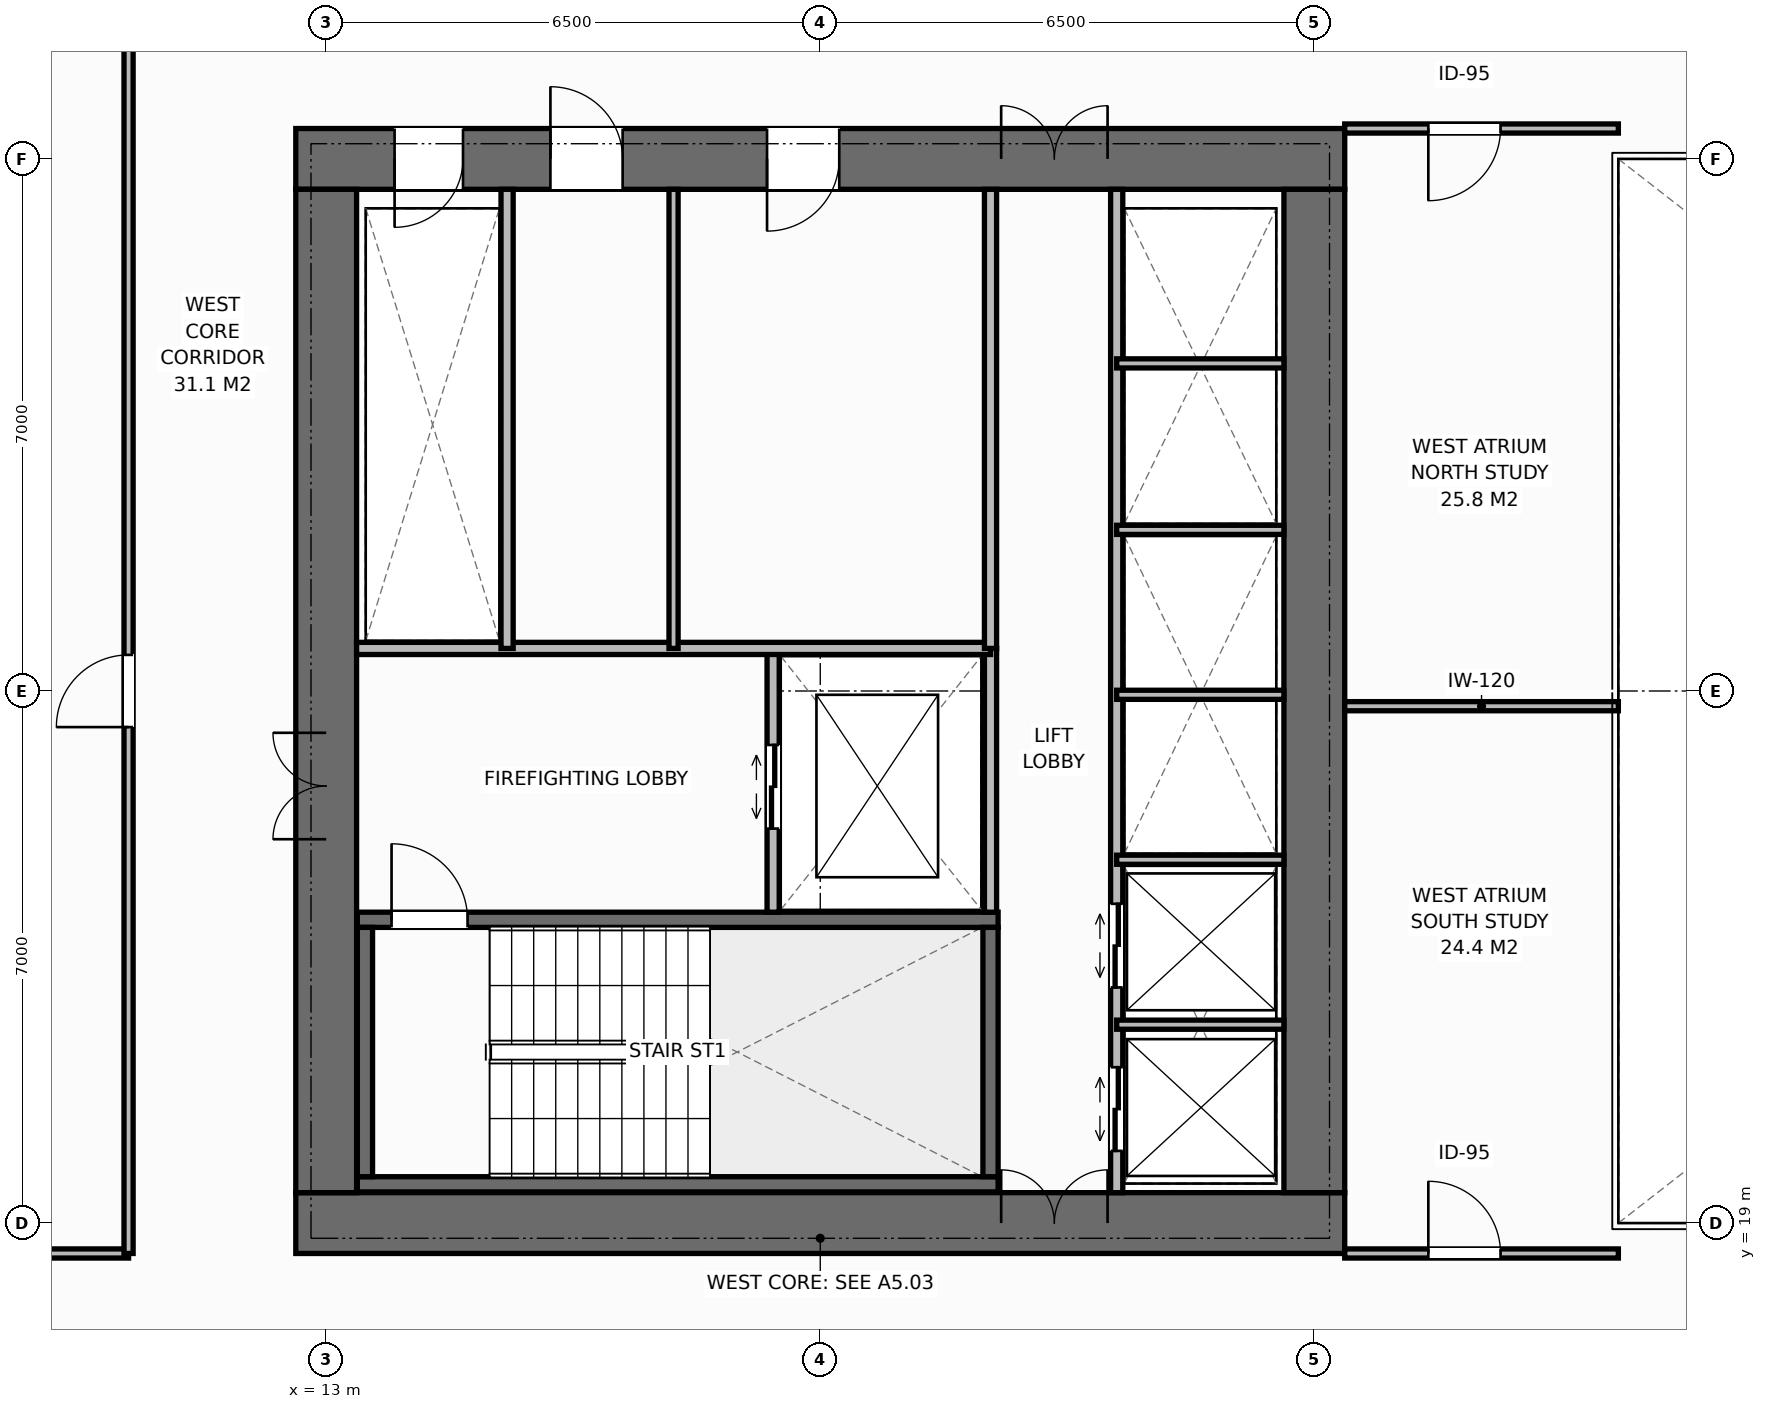
"""IFC4 building model, lengths in metres.
Left out: names, types, materials, properties, quantities, classifications, styles, units other than length and angle.
Written with IfcOpenShell. Run it as: python <this file> out.ifc"""

import sys

from ifc_helpers import new_model, si_unit, direction, frame, frame_2d, origin, place, context, subcontext, project, spatial, rectangle, extrude, element, fill, save


model = new_model("IFC4")
c1 = context("Model", 3, precision=1e-05, world=origin(), true_north=direction((0.0, 1.0)))
c2 = subcontext(c1, "Body", "Model", "MODEL_VIEW")
j1 = project(units=[si_unit("LENGTHUNIT", "METRE"), si_unit("PLANEANGLEUNIT", "RADIAN")], contexts=[c1])
p1 = place(None, origin())
s1 = spatial("IfcSite", under=j1, at=p1, CompositionType="ELEMENT")
p2 = place(p1, origin())
s2 = spatial("IfcBuilding", under=s1, at=p2, CompositionType="ELEMENT")
p3 = place(p2, frame((0.0, 0.0, 62.0)))
s3 = spatial("IfcBuildingStorey", under=s2, at=p3, CompositionType="ELEMENT", Elevation=62.0)
p4 = place(p3, frame((12.6, 19.0, 0.0), z_axis=(0.0, 0.0, 1.0), x_axis=(1.0, 0.0, 0.0)))
e1 = element("IfcWall", 1, at=p4, inside=s3, PredefinedType="SHEAR", context=c2, shape_type="SweptSolid", body=[
    extrude(rectangle(XDim=13.8, YDim=0.8, at=frame_2d((6.9, 0.0))), origin(), (0.0, 0.0, 1.0), 3.8),
])
p5 = place(p4, frame((9.28, 0.0, 0.0)))
e2 = element("IfcOpeningElement", 2, at=p5, cuts=e1, PredefinedType="OPENING", context=c2, shape_type="SweptSolid", body=[
    extrude(rectangle(XDim=1.4, YDim=2.2, at=frame_2d((0.7, 1.1))), frame((0.0, 0.41, 0.0), z_axis=(0.0, -1.0, 0.0), x_axis=(1.0, 0.0, 0.0)), (0.0, 0.0, 1.0), 0.82),
])
p6 = place(p3, frame((12.6, 33.0, 0.0), z_axis=(0.0, 0.0, 1.0), x_axis=(1.0, 0.0, 0.0)))
e3 = element("IfcWall", 3, at=p6, inside=s3, PredefinedType="SHEAR", context=c2, shape_type="SweptSolid", body=[
    extrude(rectangle(XDim=13.8, YDim=0.8, at=frame_2d((6.9, 0.0))), origin(), (0.0, 0.0, 1.0), 3.8),
])
p7 = place(p6, frame((1.3, 0.0, 0.0)))
e4 = element("IfcOpeningElement", 4, at=p7, cuts=e3, PredefinedType="OPENING", context=c2, shape_type="SweptSolid", body=[
    extrude(rectangle(XDim=0.9, YDim=2.15, at=frame_2d((0.45, 1.075))), frame((0.0, 0.41, 0.0), z_axis=(0.0, -1.0, 0.0), x_axis=(1.0, 0.0, 0.0)), (0.0, 0.0, 1.0), 0.82),
])
p8 = place(p6, frame((3.35, 0.0, 0.0)))
e5 = element("IfcOpeningElement", 5, at=p8, cuts=e3, PredefinedType="OPENING", context=c2, shape_type="SweptSolid", body=[
    extrude(rectangle(XDim=0.95, YDim=2.15, at=frame_2d((0.475, 1.075))), frame((0.0, 0.41, 0.0), z_axis=(0.0, -1.0, 0.0), x_axis=(1.0, 0.0, 0.0)), (0.0, 0.0, 1.0), 0.82),
])
p9 = place(p6, frame((6.2, 0.0, 0.0)))
e6 = element("IfcOpeningElement", 6, at=p9, cuts=e3, PredefinedType="OPENING", context=c2, shape_type="SweptSolid", body=[
    extrude(rectangle(XDim=0.95, YDim=2.15, at=frame_2d((0.475, 1.075))), frame((0.0, 0.41, 0.0), z_axis=(0.0, -1.0, 0.0), x_axis=(1.0, 0.0, 0.0)), (0.0, 0.0, 1.0), 0.82),
])
p10 = place(p6, frame((9.28, 0.0, 0.0)))
e7 = element("IfcOpeningElement", 7, at=p10, cuts=e3, PredefinedType="OPENING", context=c2, shape_type="SweptSolid", body=[
    extrude(rectangle(XDim=1.4, YDim=2.2, at=frame_2d((0.7, 1.1))), frame((0.0, 0.41, 0.0), z_axis=(0.0, -1.0, 0.0), x_axis=(1.0, 0.0, 0.0)), (0.0, 0.0, 1.0), 0.82),
])
p11 = place(p3, frame((13.0, 19.4, 0.0), z_axis=(0.0, 0.0, 1.0), x_axis=(0.0, 1.0, 0.0)))
e8 = element("IfcWall", 8, at=p11, inside=s3, PredefinedType="SHEAR", context=c2, shape_type="SweptSolid", body=[
    extrude(rectangle(XDim=13.2, YDim=0.8, at=frame_2d((6.6, 0.0))), origin(), (0.0, 0.0, 1.0), 3.8),
])
p12 = place(p11, frame((4.65, 0.0, 0.0)))
e9 = element("IfcOpeningElement", 9, at=p12, cuts=e8, PredefinedType="OPENING", context=c2, shape_type="SweptSolid", body=[
    extrude(rectangle(XDim=1.4, YDim=2.2, at=frame_2d((0.7, 1.1))), frame((0.0, 0.41, 0.0), z_axis=(0.0, -1.0, 0.0), x_axis=(1.0, 0.0, 0.0)), (0.0, 0.0, 1.0), 0.82),
])
p13 = place(p3, frame((26.0, 19.4, 0.0), z_axis=(0.0, 0.0, 1.0), x_axis=(0.0, 1.0, 0.0)))
e10 = element("IfcWall", 10, at=p13, inside=s3, PredefinedType="SHEAR", context=c2, shape_type="SweptSolid", body=[
    extrude(rectangle(XDim=13.2, YDim=0.8, at=frame_2d((6.6, 0.0))), origin(), (0.0, 0.0, 1.0), 3.8),
])
p14 = place(p3, frame((13.41, 19.51, 0.0), z_axis=(0.0, 0.0, 1.0), x_axis=(1.0, 0.0, 0.0)))
e11 = element("IfcWall", 11, at=p14, inside=s3, PredefinedType="SHEAR", context=c2, shape_type="SweptSolid", body=[
    extrude(rectangle(XDim=8.43, YDim=0.2, at=frame_2d((4.215, 0.0))), origin(), (0.0, 0.0, 1.0), 3.8),
])
p15 = place(p3, frame((13.41, 22.99, 0.0), z_axis=(0.0, 0.0, 1.0), x_axis=(1.0, 0.0, 0.0)))
e12 = element("IfcWall", 12, at=p15, inside=s3, PredefinedType="SHEAR", context=c2, shape_type="SweptSolid", body=[
    extrude(rectangle(XDim=8.43, YDim=0.2, at=frame_2d((4.215, 0.0))), origin(), (0.0, 0.0, 1.0), 3.8),
])
p16 = place(p15, frame((0.45, 0.0, 0.0)))
e13 = element("IfcOpeningElement", 13, at=p16, cuts=e12, PredefinedType="OPENING", context=c2, shape_type="SweptSolid", body=[
    extrude(rectangle(XDim=1.0, YDim=2.15, at=frame_2d((0.5, 1.075))), frame((0.0, 0.11, 0.0), z_axis=(0.0, -1.0, 0.0), x_axis=(1.0, 0.0, 0.0)), (0.0, 0.0, 1.0), 0.22),
])
for number, where, z_axis, x_axis in (
    (14, (13.51, 19.61, 0.0), (0.0, 0.0, 1.0), (0.0, 1.0, 0.0)),
    (15, (21.74, 19.61, 0.0), (0.0, 0.0, 1.0), (0.0, 1.0, 0.0)),
):
    element("IfcWall", number, at=place(p3, frame(where, z_axis=z_axis, x_axis=x_axis)), inside=s3, PredefinedType="SHEAR", context=c2, shape_type="SweptSolid", body=[
        extrude(rectangle(XDim=3.28, YDim=0.2, at=frame_2d((1.64, 0.0))), origin(), (0.0, 0.0, 1.0), 3.8),
    ])
p17 = place(p3, frame((21.74, 23.09, 0.0), z_axis=(0.0, 0.0, 1.0), x_axis=(0.0, 1.0, 0.0)))
e16 = element("IfcWall", 16, at=p17, inside=s3, PredefinedType="STANDARD", context=c2, shape_type="SweptSolid", body=[
    extrude(rectangle(XDim=3.47, YDim=0.16, at=frame_2d((1.735, 0.0))), origin(), (0.0, 0.0, 1.0), 3.55),
])
p18 = place(p3, frame((18.88, 23.09, 0.0), z_axis=(0.0, 0.0, 1.0), x_axis=(0.0, 1.0, 0.0)))
e17 = element("IfcWall", 17, at=p18, inside=s3, PredefinedType="STANDARD", context=c2, shape_type="SweptSolid", body=[
    extrude(rectangle(XDim=3.47, YDim=0.16, at=frame_2d((1.735, 0.0))), origin(), (0.0, 0.0, 1.0), 3.55),
])
p19 = place(p18, frame((1.1, 0.0, 0.0)))
e18 = element("IfcOpeningElement", 18, at=p19, cuts=e17, PredefinedType="OPENING", context=c2, shape_type="SweptSolid", body=[
    extrude(rectangle(XDim=1.1, YDim=2.2, at=frame_2d((0.55, 1.1))), frame((0.0, 0.09, 0.0), z_axis=(0.0, -1.0, 0.0), x_axis=(1.0, 0.0, 0.0)), (0.0, 0.0, 1.0), 0.18),
])
p20 = place(p3, frame((13.4, 26.56, 0.0), z_axis=(0.0, 0.0, 1.0), x_axis=(1.0, 0.0, 0.0)))
e19 = element("IfcWall", 19, at=p20, inside=s3, PredefinedType="STANDARD", context=c2, shape_type="SweptSolid", body=[
    extrude(rectangle(XDim=8.34, YDim=0.16, at=frame_2d((4.17, 0.0))), origin(), (0.0, 0.0, 1.0), 3.55),
])
p21 = place(p3, frame((15.38, 26.56, 0.0), z_axis=(0.0, 0.0, 1.0), x_axis=(0.0, 1.0, 0.0)))
e20 = element("IfcWall", 20, at=p21, inside=s3, PredefinedType="STANDARD", context=c2, shape_type="SweptSolid", body=[
    extrude(rectangle(XDim=6.04, YDim=0.16, at=frame_2d((3.02, 0.0))), origin(), (0.0, 0.0, 1.0), 3.55),
])
p22 = place(p3, frame((17.57, 26.56, 0.0), z_axis=(0.0, 0.0, 1.0), x_axis=(0.0, 1.0, 0.0)))
e21 = element("IfcWall", 21, at=p22, inside=s3, PredefinedType="PARTITIONING", context=c2, shape_type="SweptSolid", body=[
    extrude(rectangle(XDim=6.04, YDim=0.12, at=frame_2d((3.02, 0.0))), origin(), (0.0, 0.0, 1.0), 3.55),
])
p23 = place(p3, frame((21.74, 26.56, 0.0), z_axis=(0.0, 0.0, 1.0), x_axis=(0.0, 1.0, 0.0)))
e22 = element("IfcWall", 22, at=p23, inside=s3, PredefinedType="STANDARD", context=c2, shape_type="SweptSolid", body=[
    extrude(rectangle(XDim=6.04, YDim=0.16, at=frame_2d((3.02, 0.0))), origin(), (0.0, 0.0, 1.0), 3.55),
])
p24 = place(p3, frame((23.4, 19.4, 0.0), z_axis=(0.0, 0.0, 1.0), x_axis=(0.0, 1.0, 0.0)))
e23 = element("IfcWall", 23, at=p24, inside=s3, PredefinedType="STANDARD", context=c2, shape_type="SweptSolid", body=[
    extrude(rectangle(XDim=13.2, YDim=0.16, at=frame_2d((6.6, 0.0))), origin(), (0.0, 0.0, 1.0), 3.55),
])
p25 = place(p24, frame((0.55, 0.0, 0.0)))
e24 = element("IfcOpeningElement", 24, at=p25, cuts=e23, PredefinedType="OPENING", context=c2, shape_type="SweptSolid", body=[
    extrude(rectangle(XDim=1.1, YDim=2.2, at=frame_2d((0.55, 1.1))), frame((0.0, 0.09, 0.0), z_axis=(0.0, -1.0, 0.0), x_axis=(1.0, 0.0, 0.0)), (0.0, 0.0, 1.0), 0.18),
])
p26 = place(p24, frame((2.7, 0.0, 0.0)))
e25 = element("IfcOpeningElement", 25, at=p26, cuts=e23, PredefinedType="OPENING", context=c2, shape_type="SweptSolid", body=[
    extrude(rectangle(XDim=1.1, YDim=2.2, at=frame_2d((0.55, 1.1))), frame((0.0, 0.09, 0.0), z_axis=(0.0, -1.0, 0.0), x_axis=(1.0, 0.0, 0.0)), (0.0, 0.0, 1.0), 0.18),
])
for number, where, z_axis, x_axis in (
    (26, (23.4, 21.61, 0.0), (0.0, 0.0, 1.0), (1.0, 0.0, 0.0)),
    (27, (23.4, 23.78, 0.0), (0.0, 0.0, 1.0), (1.0, 0.0, 0.0)),
    (28, (23.4, 25.95, 0.0), (0.0, 0.0, 1.0), (1.0, 0.0, 0.0)),
    (29, (23.4, 28.12, 0.0), (0.0, 0.0, 1.0), (1.0, 0.0, 0.0)),
    (30, (23.4, 30.31, 0.0), (0.0, 0.0, 1.0), (1.0, 0.0, 0.0)),
):
    element("IfcWall", number, at=place(p3, frame(where, z_axis=z_axis, x_axis=x_axis)), inside=s3, PredefinedType="PARTITIONING", context=c2, shape_type="SweptSolid", body=[
        extrude(rectangle(XDim=2.2, YDim=0.12, at=frame_2d((1.1, 0.0))), origin(), (0.0, 0.0, 1.0), 3.55),
    ])
p27 = place(p3, frame((26.4, 25.8, 0.0), z_axis=(0.0, 0.0, 1.0), x_axis=(1.0, 0.0, 0.0)))
e31 = element("IfcWall", 31, at=p27, inside=s3, PredefinedType="PARTITIONING", context=c2, shape_type="SweptSolid", body=[
    extrude(rectangle(XDim=3.6, YDim=0.12, at=frame_2d((1.8, 0.0))), origin(), (0.0, 0.0, 1.0), 3.55),
])
p28 = place(p3, frame((26.4, 18.6, 0.0), z_axis=(0.0, 0.0, 1.0), x_axis=(1.0, 0.0, 0.0)))
e32 = element("IfcWall", 32, at=p28, inside=s3, PredefinedType="PARTITIONING", context=c2, shape_type="SweptSolid", body=[
    extrude(rectangle(XDim=3.6, YDim=0.12, at=frame_2d((1.8, 0.0))), origin(), (0.0, 0.0, 1.0), 3.55),
])
p29 = place(p28, frame((1.1, 0.0, 0.0)))
e33 = element("IfcOpeningElement", 33, at=p29, cuts=e32, PredefinedType="OPENING", context=c2, shape_type="SweptSolid", body=[
    extrude(rectangle(XDim=0.95, YDim=2.15, at=frame_2d((0.475, 1.075))), frame((0.0, 0.07, 0.0), z_axis=(0.0, -1.0, 0.0), x_axis=(1.0, 0.0, 0.0)), (0.0, 0.0, 1.0), 0.14),
])
p30 = place(p3, frame((26.4, 33.4, 0.0), z_axis=(0.0, 0.0, 1.0), x_axis=(1.0, 0.0, 0.0)))
e34 = element("IfcWall", 34, at=p30, inside=s3, PredefinedType="PARTITIONING", context=c2, shape_type="SweptSolid", body=[
    extrude(rectangle(XDim=3.6, YDim=0.12, at=frame_2d((1.8, 0.0))), origin(), (0.0, 0.0, 1.0), 3.55),
])
p31 = place(p30, frame((1.1, 0.0, 0.0)))
e35 = element("IfcOpeningElement", 35, at=p31, cuts=e34, PredefinedType="OPENING", context=c2, shape_type="SweptSolid", body=[
    extrude(rectangle(XDim=0.95, YDim=2.15, at=frame_2d((0.475, 1.075))), frame((0.0, 0.07, 0.0), z_axis=(0.0, -1.0, 0.0), x_axis=(1.0, 0.0, 0.0)), (0.0, 0.0, 1.0), 0.14),
])
p32 = place(p3, frame((-0.18, 18.6, 0.0), z_axis=(0.0, 0.0, 1.0), x_axis=(1.0, 0.0, 0.0)))
e36 = element("IfcWall", 36, at=p32, inside=s3, PredefinedType="PARTITIONING", context=c2, shape_type="SweptSolid", body=[
    extrude(rectangle(XDim=10.58, YDim=0.12, at=frame_2d((5.29, 0.0))), origin(), (0.0, 0.0, 1.0), 3.55),
])
p33 = place(p3, frame((10.4, 18.6, 0.0), z_axis=(0.0, 0.0, 1.0), x_axis=(0.0, 1.0, 0.0)))
e37 = element("IfcWall", 37, at=p33, inside=s3, PredefinedType="PARTITIONING", context=c2, shape_type="SweptSolid", body=[
    extrude(rectangle(XDim=16.9, YDim=0.12, at=frame_2d((8.45, 0.0))), origin(), (0.0, 0.0, 1.0), 3.55),
])
p34 = place(p33, frame((6.925, 0.0, 0.0)))
e38 = element("IfcOpeningElement", 38, at=p34, cuts=e37, PredefinedType="OPENING", context=c2, shape_type="SweptSolid", body=[
    extrude(rectangle(XDim=0.95, YDim=2.15, at=frame_2d((0.475, 1.075))), frame((0.0, 0.07, 0.0), z_axis=(0.0, -1.0, 0.0), x_axis=(1.0, 0.0, 0.0)), (0.0, 0.0, 1.0), 0.14),
])
p35 = place(p16, origin())
e39 = element("IfcDoor", 39, at=p35, inside=s3, OperationType="SINGLE_SWING_LEFT", PredefinedType="DOOR", context=c2, shape_type="SweptSolid", body=[
    extrude(rectangle(XDim=1.0, YDim=2.15, at=frame_2d((0.5, 1.075))), frame((0.0, 0.025, 0.0), z_axis=(0.0, -1.0, 0.0), x_axis=(1.0, 0.0, 0.0)), (0.0, 0.0, 1.0), 0.05),
])
fill(e13, e39)
p36 = place(p12, origin())
e40 = element("IfcDoor", 40, at=p36, inside=s3, OperationType="DOUBLE_DOOR_SINGLE_SWING", PredefinedType="DOOR", context=c2, shape_type="SweptSolid", body=[
    extrude(rectangle(XDim=1.4, YDim=2.2, at=frame_2d((0.7, 1.1))), frame((0.0, 0.025, 0.0), z_axis=(0.0, -1.0, 0.0), x_axis=(1.0, 0.0, 0.0)), (0.0, 0.0, 1.0), 0.05),
])
fill(e9, e40)
p37 = place(p19, origin())
e41 = element("IfcDoor", 41, at=p37, inside=s3, OperationType="DOUBLE_DOOR_SLIDING", PredefinedType="DOOR", context=c2, shape_type="SweptSolid", body=[
    extrude(rectangle(XDim=1.1, YDim=2.2, at=frame_2d((0.55, 1.1))), frame((0.0, 0.025, 0.0), z_axis=(0.0, -1.0, 0.0), x_axis=(1.0, 0.0, 0.0)), (0.0, 0.0, 1.0), 0.05),
])
fill(e18, e41)
p38 = place(p7, origin())
e42 = element("IfcDoor", 42, at=p38, inside=s3, OperationType="SINGLE_SWING_RIGHT", PredefinedType="DOOR", context=c2, shape_type="SweptSolid", body=[
    extrude(rectangle(XDim=0.9, YDim=2.15, at=frame_2d((0.45, 1.075))), frame((0.0, -0.075, 0.0), z_axis=(0.0, -1.0, 0.0), x_axis=(1.0, 0.0, 0.0)), (0.0, 0.0, 1.0), 0.05),
])
fill(e4, e42)
p39 = place(p8, origin())
e43 = element("IfcDoor", 43, at=p39, inside=s3, OperationType="SINGLE_SWING_LEFT", PredefinedType="DOOR", context=c2, shape_type="SweptSolid", body=[
    extrude(rectangle(XDim=0.95, YDim=2.15, at=frame_2d((0.475, 1.075))), frame((0.0, -0.075, 0.0), z_axis=(0.0, -1.0, 0.0), x_axis=(1.0, 0.0, 0.0)), (0.0, 0.0, 1.0), 0.05),
])
fill(e5, e43)
p40 = place(p9, origin())
e44 = element("IfcDoor", 44, at=p40, inside=s3, OperationType="SINGLE_SWING_RIGHT", PredefinedType="DOOR", context=c2, shape_type="SweptSolid", body=[
    extrude(rectangle(XDim=0.95, YDim=2.15, at=frame_2d((0.475, 1.075))), frame((0.0, -0.075, 0.0), z_axis=(0.0, -1.0, 0.0), x_axis=(1.0, 0.0, 0.0)), (0.0, 0.0, 1.0), 0.05),
])
fill(e6, e44)
p41 = place(p5, origin())
e45 = element("IfcDoor", 45, at=p41, inside=s3, OperationType="DOUBLE_DOOR_SINGLE_SWING", PredefinedType="DOOR", context=c2, shape_type="SweptSolid", body=[
    extrude(rectangle(XDim=1.4, YDim=2.2, at=frame_2d((0.7, 1.1))), frame((0.0, 0.125, 0.0), z_axis=(0.0, -1.0, 0.0), x_axis=(1.0, 0.0, 0.0)), (0.0, 0.0, 1.0), 0.05),
])
fill(e2, e45)
p42 = place(p10, origin())
e46 = element("IfcDoor", 46, at=p42, inside=s3, OperationType="DOUBLE_DOOR_SINGLE_SWING", PredefinedType="DOOR", context=c2, shape_type="SweptSolid", body=[
    extrude(rectangle(XDim=1.4, YDim=2.2, at=frame_2d((0.7, 1.1))), frame((0.0, -0.075, 0.0), z_axis=(0.0, -1.0, 0.0), x_axis=(1.0, 0.0, 0.0)), (0.0, 0.0, 1.0), 0.05),
])
fill(e7, e46)
p43 = place(p25, origin())
e47 = element("IfcDoor", 47, at=p43, inside=s3, OperationType="DOUBLE_DOOR_SLIDING", PredefinedType="DOOR", context=c2, shape_type="SweptSolid", body=[
    extrude(rectangle(XDim=1.1, YDim=2.2, at=frame_2d((0.55, 1.1))), frame((0.0, 0.025, 0.0), z_axis=(0.0, -1.0, 0.0), x_axis=(1.0, 0.0, 0.0)), (0.0, 0.0, 1.0), 0.05),
])
fill(e24, e47)
p44 = place(p26, origin())
e48 = element("IfcDoor", 48, at=p44, inside=s3, OperationType="DOUBLE_DOOR_SLIDING", PredefinedType="DOOR", context=c2, shape_type="SweptSolid", body=[
    extrude(rectangle(XDim=1.1, YDim=2.2, at=frame_2d((0.55, 1.1))), frame((0.0, 0.025, 0.0), z_axis=(0.0, -1.0, 0.0), x_axis=(1.0, 0.0, 0.0)), (0.0, 0.0, 1.0), 0.05),
])
fill(e25, e48)
p45 = place(p29, origin())
e49 = element("IfcDoor", 49, at=p45, inside=s3, OperationType="SINGLE_SWING_LEFT", PredefinedType="DOOR", context=c2, shape_type="SweptSolid", body=[
    extrude(rectangle(XDim=0.95, YDim=2.15, at=frame_2d((0.475, 1.075))), frame((0.0, 0.025, 0.0), z_axis=(0.0, -1.0, 0.0), x_axis=(1.0, 0.0, 0.0)), (0.0, 0.0, 1.0), 0.05),
])
fill(e33, e49)
p46 = place(p31, origin())
e50 = element("IfcDoor", 50, at=p46, inside=s3, OperationType="SINGLE_SWING_RIGHT", PredefinedType="DOOR", context=c2, shape_type="SweptSolid", body=[
    extrude(rectangle(XDim=0.95, YDim=2.15, at=frame_2d((0.475, 1.075))), frame((0.0, 0.025, 0.0), z_axis=(0.0, -1.0, 0.0), x_axis=(1.0, 0.0, 0.0)), (0.0, 0.0, 1.0), 0.05),
])
fill(e35, e50)
p47 = place(p34, origin())
e51 = element("IfcDoor", 51, at=p47, inside=s3, OperationType="SINGLE_SWING_LEFT", PredefinedType="DOOR", context=c2, shape_type="SweptSolid", body=[
    extrude(rectangle(XDim=0.95, YDim=2.15, at=frame_2d((0.475, 1.075))), frame((0.0, 0.025, 0.0), z_axis=(0.0, -1.0, 0.0), x_axis=(1.0, 0.0, 0.0)), (0.0, 0.0, 1.0), 0.05),
])
fill(e38, e51)
save(model, sys.argv[1])
